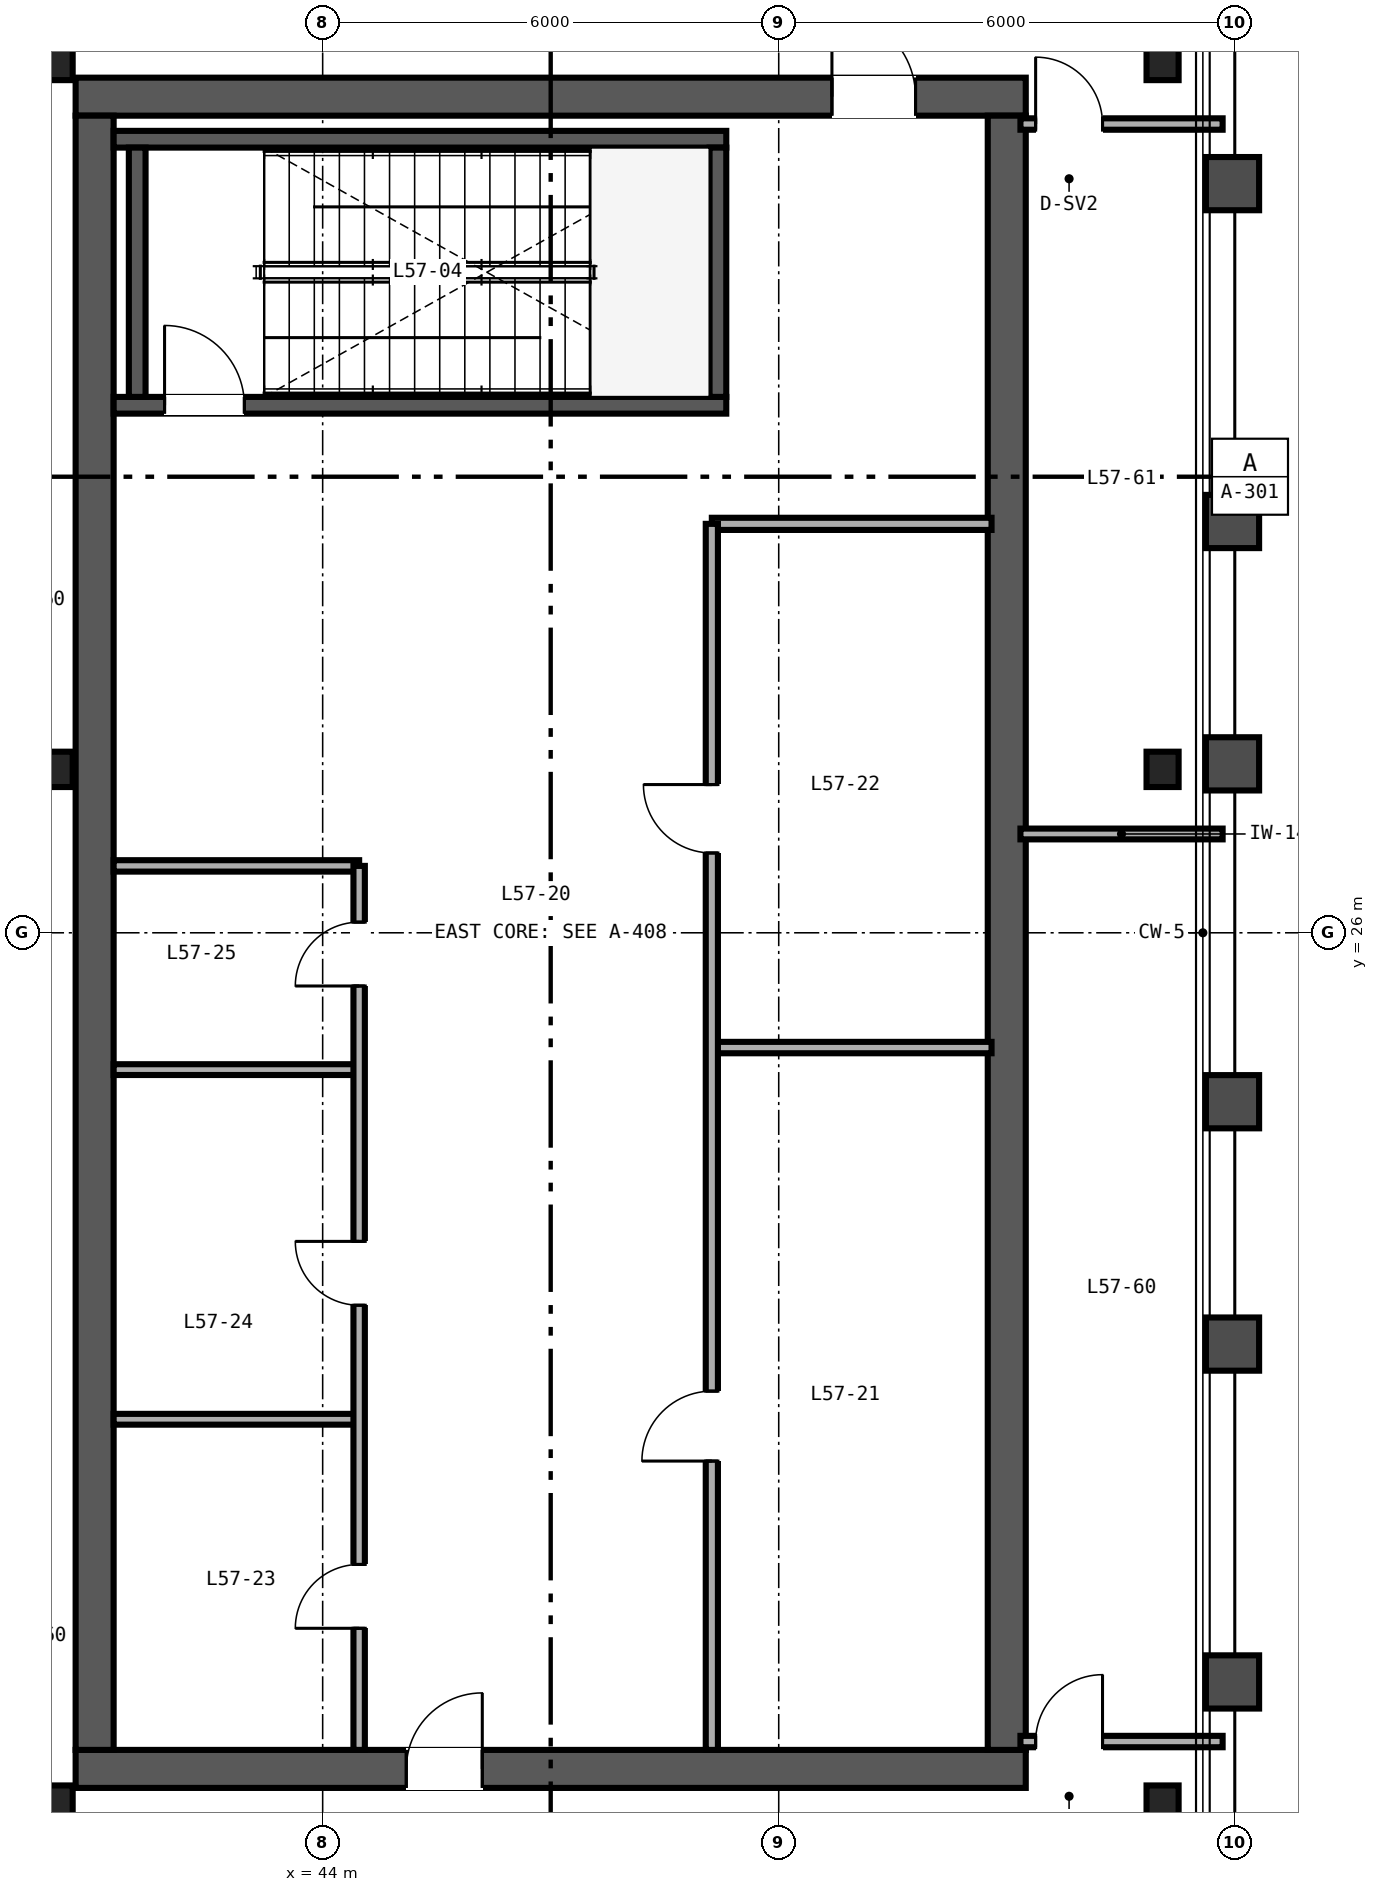
"""IFC4 building model, lengths in metres.
Left out: names, types, materials, properties, quantities, classifications, styles, units other than length and angle.
Written with IfcOpenShell. Run it as: python <this file> out.ifc"""

import sys

from ifc_helpers import new_model, si_unit, direction, frame, frame_2d, origin, origin_2d, place, context, subcontext, project, spatial, rectangle, i_section, extrude, source, transform, mapped, element, fill, save


model = new_model("IFC4")
c1 = context("Model", 3, precision=1e-05, world=origin(), true_north=direction((0.0, 1.0)))
c2 = subcontext(c1, "Body", "Model", "MODEL_VIEW")
j1 = project(units=[si_unit("LENGTHUNIT", "METRE"), si_unit("PLANEANGLEUNIT", "RADIAN")], contexts=[c1])
p1 = place(None, origin())
s1 = spatial("IfcSite", under=j1, at=p1, CompositionType="ELEMENT")
p2 = place(p1, origin())
s2 = spatial("IfcBuilding", under=s1, at=p2, CompositionType="ELEMENT")
p3 = place(p2, frame((0.0, 0.0, 228.0)))
s3 = spatial("IfcBuildingStorey", under=s2, at=p3, CompositionType="ELEMENT", Elevation=228.0)
p4 = place(p3, frame((40.75, 15.0, 0.0), z_axis=(0.0, 0.0, 1.0), x_axis=(1.0, 0.0, 0.0)))
e1 = element("IfcWall", 1, at=p4, inside=s3, PredefinedType="SHEAR", context=c2, shape_type="SweptSolid", body=[
    extrude(rectangle(XDim=12.5, YDim=0.5, at=frame_2d((6.25, 0.0))), origin(), (0.0, 0.0, 1.0), 4.58),
])
p5 = place(p4, frame((4.35, 0.0, 0.0)))
e2 = element("IfcOpeningElement", 2, at=p5, cuts=e1, PredefinedType="OPENING", context=c2, shape_type="SweptSolid", body=[
    extrude(rectangle(XDim=1.0, YDim=2.15, at=frame_2d((0.5, 1.075))), frame((0.0, 0.26, 0.0), z_axis=(0.0, -1.0, 0.0), x_axis=(1.0, 0.0, 0.0)), (0.0, 0.0, 1.0), 0.52),
])
p6 = place(p3, frame((40.75, 37.0, 0.0), z_axis=(0.0, 0.0, 1.0), x_axis=(1.0, 0.0, 0.0)))
e3 = element("IfcWall", 3, at=p6, inside=s3, PredefinedType="SHEAR", context=c2, shape_type="SweptSolid", body=[
    extrude(rectangle(XDim=12.5, YDim=0.5, at=frame_2d((6.25, 0.0))), origin(), (0.0, 0.0, 1.0), 4.58),
])
p7 = place(p6, frame((9.95, 0.0, 0.0)))
e4 = element("IfcOpeningElement", 4, at=p7, cuts=e3, PredefinedType="OPENING", context=c2, shape_type="SweptSolid", body=[
    extrude(rectangle(XDim=1.1, YDim=2.15, at=frame_2d((0.55, 1.075))), frame((0.0, 0.26, 0.0), z_axis=(0.0, -1.0, 0.0), x_axis=(1.0, 0.0, 0.0)), (0.0, 0.0, 1.0), 0.52),
])
for number, where, z_axis, x_axis in (
    (5, (41.0, 15.25, 0.0), (0.0, 0.0, 1.0), (0.0, 1.0, 0.0)),
    (6, (53.0, 15.25, 0.0), (0.0, 0.0, 1.0), (0.0, 1.0, 0.0)),
):
    element("IfcWall", number, at=place(p3, frame(where, z_axis=z_axis, x_axis=x_axis)), inside=s3, PredefinedType="SHEAR", context=c2, shape_type="SweptSolid", body=[
        extrude(rectangle(XDim=21.5, YDim=0.5, at=frame_2d((10.75, 0.0))), origin(), (0.0, 0.0, 1.0), 4.58),
    ])
p8 = place(p3, frame((41.25, 32.94, 0.0), z_axis=(0.0, 0.0, 1.0), x_axis=(1.0, 0.0, 0.0)))
e7 = element("IfcWall", 7, at=p8, inside=s3, PredefinedType="SHEAR", context=c2, shape_type="SweptSolid", body=[
    extrude(rectangle(XDim=8.06, YDim=0.22, at=frame_2d((4.03, 0.0))), origin(), (0.0, 0.0, 1.0), 4.6),
])
p9 = place(p8, frame((0.67, 0.0, 0.0)))
e8 = element("IfcOpeningElement", 8, at=p9, cuts=e7, PredefinedType="OPENING", context=c2, shape_type="SweptSolid", body=[
    extrude(rectangle(XDim=1.05, YDim=2.15, at=frame_2d((0.525, 1.075))), frame((0.0, 0.12, 0.0), z_axis=(0.0, -1.0, 0.0), x_axis=(1.0, 0.0, 0.0)), (0.0, 0.0, 1.0), 0.24),
])
p10 = place(p3, frame((41.25, 36.44, 0.0), z_axis=(0.0, 0.0, 1.0), x_axis=(1.0, 0.0, 0.0)))
e9 = element("IfcWall", 9, at=p10, inside=s3, PredefinedType="SHEAR", context=c2, shape_type="SweptSolid", body=[
    extrude(rectangle(XDim=8.06, YDim=0.22, at=frame_2d((4.03, 0.0))), origin(), (0.0, 0.0, 1.0), 4.6),
])
for number, where, z_axis, x_axis in (
    (10, (41.56, 33.05, 0.0), (0.0, 0.0, 1.0), (0.0, 1.0, 0.0)),
    (11, (49.2, 33.05, 0.0), (0.0, 0.0, 1.0), (0.0, 1.0, 0.0)),
):
    element("IfcWall", number, at=place(p3, frame(where, z_axis=z_axis, x_axis=x_axis)), inside=s3, PredefinedType="SHEAR", context=c2, shape_type="SweptSolid", body=[
        extrude(rectangle(XDim=3.28, YDim=0.22, at=frame_2d((1.64, 0.0))), origin(), (0.0, 0.0, 1.0), 4.6),
    ])
m1 = source(origin(), c2, "Body", "SweptSolid", [
    extrude(i_section(OverallWidth=0.422, OverallDepth=0.465, WebThickness=0.045, FlangeThickness=0.073, FilletRadius=0.025, at=origin_2d()), origin(), (0.0, 0.0, 1.0), 4.58),
])
for number, where, z_axis, x_axis in (
    (12, (40.5, 14.55, 0.0), (0.0, 0.0, 1.0), (1.0, 0.0, 0.0)),
    (13, (55.05, 14.55, 0.0), (0.0, 0.0, 1.0), (1.0, 0.0, 0.0)),
    (14, (40.5, 28.15, 0.0), (0.0, 0.0, 1.0), (1.0, 0.0, 0.0)),
    (15, (55.05, 28.15, 0.0), (0.0, 0.0, 1.0), (1.0, 0.0, 0.0)),
    (16, (40.5, 37.45, 0.0), (0.0, 0.0, 1.0), (1.0, 0.0, 0.0)),
    (17, (55.05, 37.45, 0.0), (0.0, 0.0, 1.0), (1.0, 0.0, 0.0)),
):
    element("IfcColumn", number, at=place(p3, frame(where, z_axis=z_axis, x_axis=x_axis)), inside=s3, PredefinedType="COLUMN", context=c2, shape_type="MappedRepresentation", body=[
        mapped(m1, transform((0.0, 0.0, 0.0), scale=1.0)),
    ])
p11 = place(p3, frame((49.12, 31.38, 0.0), z_axis=(0.0, 0.0, 1.0), x_axis=(1.0, 0.0, 0.0)))
e18 = element("IfcWall", 18, at=p11, inside=s3, PredefinedType="PARTITIONING", context=c2, shape_type="SweptSolid", body=[
    extrude(rectangle(XDim=3.68, YDim=0.16, at=frame_2d((1.84, 0.0))), origin(), (0.0, 0.0, 1.0), 3.68),
])
p12 = place(p3, frame((49.12, 24.49, 0.0), z_axis=(0.0, 0.0, 1.0), x_axis=(1.0, 0.0, 0.0)))
e19 = element("IfcWall", 19, at=p12, inside=s3, PredefinedType="PARTITIONING", context=c2, shape_type="SweptSolid", body=[
    extrude(rectangle(XDim=3.68, YDim=0.15, at=frame_2d((1.84, 0.0))), origin(), (0.0, 0.0, 1.0), 4.58),
])
p13 = place(p3, frame((49.12, 15.25, 0.0), z_axis=(0.0, 0.0, 1.0), x_axis=(0.0, 1.0, 0.0)))
e20 = element("IfcWall", 20, at=p13, inside=s3, PredefinedType="PARTITIONING", context=c2, shape_type="SweptSolid", body=[
    extrude(rectangle(XDim=16.13, YDim=0.16, at=frame_2d((8.065, 0.0))), origin(), (0.0, 0.0, 1.0), 3.653),
])
p14 = place(p13, frame((3.8, 0.0, 0.0)))
e21 = element("IfcOpeningElement", 21, at=p14, cuts=e20, PredefinedType="OPENING", context=c2, shape_type="SweptSolid", body=[
    extrude(rectangle(XDim=0.92, YDim=2.15, at=frame_2d((0.46, 1.075))), frame((0.0, 0.09, 0.0), z_axis=(0.0, -1.0, 0.0), x_axis=(1.0, 0.0, 0.0)), (0.0, 0.0, 1.0), 0.18),
])
p15 = place(p13, frame((11.8, 0.0, 0.0)))
e22 = element("IfcOpeningElement", 22, at=p15, cuts=e20, PredefinedType="OPENING", context=c2, shape_type="SweptSolid", body=[
    extrude(rectangle(XDim=0.9, YDim=2.15, at=frame_2d((0.45, 1.075))), frame((0.0, 0.09, 0.0), z_axis=(0.0, -1.0, 0.0), x_axis=(1.0, 0.0, 0.0)), (0.0, 0.0, 1.0), 0.18),
])
p16 = place(p3, frame((41.25, 26.88, 0.0), z_axis=(0.0, 0.0, 1.0), x_axis=(1.0, 0.0, 0.0)))
e23 = element("IfcWall", 23, at=p16, inside=s3, PredefinedType="PARTITIONING", context=c2, shape_type="SweptSolid", body=[
    extrude(rectangle(XDim=3.23, YDim=0.15, at=frame_2d((1.615, 0.0))), origin(), (0.0, 0.0, 1.0), 4.58),
])
for number, where, z_axis, x_axis in (
    (24, (41.25, 19.6, 0.0), (0.0, 0.0, 1.0), (1.0, 0.0, 0.0)),
    (25, (41.25, 24.2, 0.0), (0.0, 0.0, 1.0), (1.0, 0.0, 0.0)),
):
    element("IfcWall", number, at=place(p3, frame(where, z_axis=z_axis, x_axis=x_axis)), inside=s3, PredefinedType="PARTITIONING", context=c2, shape_type="SweptSolid", body=[
        extrude(rectangle(XDim=3.23, YDim=0.142, at=frame_2d((1.615, 0.0))), origin(), (0.0, 0.0, 1.0), 4.58),
    ])
p17 = place(p3, frame((44.48, 15.25, 0.0), z_axis=(0.0, 0.0, 1.0), x_axis=(0.0, 1.0, 0.0)))
e26 = element("IfcWall", 26, at=p17, inside=s3, PredefinedType="PARTITIONING", context=c2, shape_type="SweptSolid", body=[
    extrude(rectangle(XDim=11.63, YDim=0.15, at=frame_2d((5.815, 0.0))), origin(), (0.0, 0.0, 1.0), 4.58),
])
p18 = place(p17, frame((1.6, 0.0, 0.0)))
e27 = element("IfcOpeningElement", 27, at=p18, cuts=e26, PredefinedType="OPENING", context=c2, shape_type="SweptSolid", body=[
    extrude(rectangle(XDim=0.84, YDim=2.1, at=frame_2d((0.42, 1.05))), frame((0.0, 0.085, 0.0), z_axis=(0.0, -1.0, 0.0), x_axis=(1.0, 0.0, 0.0)), (0.0, 0.0, 1.0), 0.17),
])
p19 = place(p17, frame((5.85, 0.0, 0.0)))
e28 = element("IfcOpeningElement", 28, at=p19, cuts=e26, PredefinedType="OPENING", context=c2, shape_type="SweptSolid", body=[
    extrude(rectangle(XDim=0.84, YDim=2.1, at=frame_2d((0.42, 1.05))), frame((0.0, 0.085, 0.0), z_axis=(0.0, -1.0, 0.0), x_axis=(1.0, 0.0, 0.0)), (0.0, 0.0, 1.0), 0.17),
])
p20 = place(p17, frame((10.05, 0.0, 0.0)))
e29 = element("IfcOpeningElement", 29, at=p20, cuts=e26, PredefinedType="OPENING", context=c2, shape_type="SweptSolid", body=[
    extrude(rectangle(XDim=0.84, YDim=2.1, at=frame_2d((0.42, 1.05))), frame((0.0, 0.085, 0.0), z_axis=(0.0, -1.0, 0.0), x_axis=(1.0, 0.0, 0.0)), (0.0, 0.0, 1.0), 0.17),
])
p21 = place(p3, frame((53.18, 15.36, 0.0), z_axis=(0.0, 0.0, 1.0), x_axis=(1.0, 0.0, 0.0)))
e30 = element("IfcWall", 30, at=p21, inside=s3, PredefinedType="PARTITIONING", context=c2, shape_type="SweptSolid", body=[
    extrude(rectangle(XDim=2.66, YDim=0.15, at=frame_2d((1.33, 0.0))), origin(), (0.0, 0.0, 1.0), 3.801),
])
p22 = place(p21, frame((0.2, 0.0, 0.0)))
e31 = element("IfcOpeningElement", 31, at=p22, cuts=e30, PredefinedType="OPENING", context=c2, shape_type="SweptSolid", body=[
    extrude(rectangle(XDim=0.88, YDim=2.15, at=frame_2d((0.44, 1.075))), frame((0.0, 0.085, 0.0), z_axis=(0.0, -1.0, 0.0), x_axis=(1.0, 0.0, 0.0)), (0.0, 0.0, 1.0), 0.17),
])
p23 = place(p3, frame((53.18, 36.64, 0.0), z_axis=(0.0, 0.0, 1.0), x_axis=(1.0, 0.0, 0.0)))
e32 = element("IfcWall", 32, at=p23, inside=s3, PredefinedType="PARTITIONING", context=c2, shape_type="SweptSolid", body=[
    extrude(rectangle(XDim=2.66, YDim=0.15, at=frame_2d((1.33, 0.0))), origin(), (0.0, 0.0, 1.0), 3.963),
])
p24 = place(p23, frame((0.2, 0.0, 0.0)))
e33 = element("IfcOpeningElement", 33, at=p24, cuts=e32, PredefinedType="OPENING", context=c2, shape_type="SweptSolid", body=[
    extrude(rectangle(XDim=0.88, YDim=2.15, at=frame_2d((0.44, 1.075))), frame((0.0, 0.085, 0.0), z_axis=(0.0, -1.0, 0.0), x_axis=(1.0, 0.0, 0.0)), (0.0, 0.0, 1.0), 0.17),
])
p25 = place(p3, frame((53.18, 27.3, 0.0), z_axis=(0.0, 0.0, 1.0), x_axis=(1.0, 0.0, 0.0)))
e34 = element("IfcWall", 34, at=p25, inside=s3, PredefinedType="PARTITIONING", context=c2, shape_type="SweptSolid", body=[
    extrude(rectangle(XDim=2.66, YDim=0.142, at=frame_2d((1.33, 0.0))), origin(), (0.0, 0.0, 1.0), 3.801),
])
m2 = source(origin(), c2, "Body", "SweptSolid", [
    extrude(rectangle(XDim=1.05, YDim=2.15, at=frame_2d((0.525, 1.075))), frame((0.0, 0.025, 0.0), z_axis=(0.0, -1.0, 0.0), x_axis=(1.0, 0.0, 0.0)), (0.0, 0.0, 1.0), 0.05),
])
p26 = place(p9, origin())
e35 = element("IfcDoor", 35, at=p26, inside=s3, OperationType="SINGLE_SWING_LEFT", PredefinedType="DOOR", context=c2, shape_type="MappedRepresentation", body=[
    mapped(m2, transform((0.0, 0.0, 0.0), scale=1.0)),
])
fill(e8, e35)
m3 = source(origin(), c2, "Body", "SweptSolid", [
    extrude(rectangle(XDim=1.0, YDim=2.15, at=frame_2d((0.5, 1.075))), frame((0.0, 0.025, 0.0), z_axis=(0.0, -1.0, 0.0), x_axis=(1.0, 0.0, 0.0)), (0.0, 0.0, 1.0), 0.05),
])
p27 = place(p5, origin())
e36 = element("IfcDoor", 36, at=p27, inside=s3, OperationType="SINGLE_SWING_RIGHT", PredefinedType="DOOR", context=c2, shape_type="MappedRepresentation", body=[
    mapped(m3, transform((0.0, 0.0, 0.0), scale=1.0)),
])
fill(e2, e36)
m4 = source(origin(), c2, "Body", "SweptSolid", [
    extrude(rectangle(XDim=1.1, YDim=2.15, at=frame_2d((0.55, 1.075))), frame((0.0, 0.025, 0.0), z_axis=(0.0, -1.0, 0.0), x_axis=(1.0, 0.0, 0.0)), (0.0, 0.0, 1.0), 0.05),
])
p28 = place(p7, origin())
e37 = element("IfcDoor", 37, at=p28, inside=s3, OperationType="SINGLE_SWING_LEFT", PredefinedType="DOOR", context=c2, shape_type="MappedRepresentation", body=[
    mapped(m4, transform((0.0, 0.0, 0.0), scale=1.0)),
])
fill(e4, e37)
m5 = source(origin(), c2, "Body", "SweptSolid", [
    extrude(rectangle(XDim=0.92, YDim=2.15, at=frame_2d((0.46, 1.075))), frame((0.0, 0.025, 0.0), z_axis=(0.0, -1.0, 0.0), x_axis=(1.0, 0.0, 0.0)), (0.0, 0.0, 1.0), 0.05),
])
p29 = place(p14, origin())
e38 = element("IfcDoor", 38, at=p29, inside=s3, OperationType="SINGLE_SWING_LEFT", PredefinedType="DOOR", context=c2, shape_type="MappedRepresentation", body=[
    mapped(m5, transform((0.0, 0.0, 0.0), scale=1.0)),
])
fill(e21, e38)
m6 = source(origin(), c2, "Body", "SweptSolid", [
    extrude(rectangle(XDim=0.9, YDim=2.15, at=frame_2d((0.45, 1.075))), frame((0.0, 0.025, 0.0), z_axis=(0.0, -1.0, 0.0), x_axis=(1.0, 0.0, 0.0)), (0.0, 0.0, 1.0), 0.05),
])
p30 = place(p15, origin())
e39 = element("IfcDoor", 39, at=p30, inside=s3, OperationType="SINGLE_SWING_RIGHT", PredefinedType="DOOR", context=c2, shape_type="MappedRepresentation", body=[
    mapped(m6, transform((0.0, 0.0, 0.0), scale=1.0)),
])
fill(e22, e39)
m7 = source(origin(), c2, "Body", "SweptSolid", [
    extrude(rectangle(XDim=0.84, YDim=2.1, at=frame_2d((0.42, 1.05))), frame((0.0, 0.025, 0.0), z_axis=(0.0, -1.0, 0.0), x_axis=(1.0, 0.0, 0.0)), (0.0, 0.0, 1.0), 0.05),
])
p31 = place(p18, origin())
e40 = element("IfcDoor", 40, at=p31, inside=s3, OperationType="SINGLE_SWING_LEFT", PredefinedType="DOOR", context=c2, shape_type="MappedRepresentation", body=[
    mapped(m7, transform((0.0, 0.0, 0.0), scale=1.0)),
])
fill(e27, e40)
p32 = place(p19, origin())
e41 = element("IfcDoor", 41, at=p32, inside=s3, OperationType="SINGLE_SWING_RIGHT", PredefinedType="DOOR", context=c2, shape_type="MappedRepresentation", body=[
    mapped(m7, transform((0.0, 0.0, 0.0), scale=1.0)),
])
fill(e28, e41)
p33 = place(p20, origin())
e42 = element("IfcDoor", 42, at=p33, inside=s3, OperationType="SINGLE_SWING_LEFT", PredefinedType="DOOR", context=c2, shape_type="MappedRepresentation", body=[
    mapped(m7, transform((0.0, 0.0, 0.0), scale=1.0)),
])
fill(e29, e42)
m8 = source(origin(), c2, "Body", "SweptSolid", [
    extrude(rectangle(XDim=0.88, YDim=2.15, at=frame_2d((0.44, 1.075))), frame((0.0, 0.025, 0.0), z_axis=(0.0, -1.0, 0.0), x_axis=(1.0, 0.0, 0.0)), (0.0, 0.0, 1.0), 0.05),
])
p34 = place(p22, origin())
e43 = element("IfcDoor", 43, at=p34, inside=s3, OperationType="SINGLE_SWING_RIGHT", PredefinedType="DOOR", context=c2, shape_type="MappedRepresentation", body=[
    mapped(m8, transform((0.0, 0.0, 0.0), scale=1.0)),
])
fill(e31, e43)
p35 = place(p24, origin())
e44 = element("IfcDoor", 44, at=p35, inside=s3, OperationType="SINGLE_SWING_LEFT", PredefinedType="DOOR", context=c2, shape_type="MappedRepresentation", body=[
    mapped(m8, transform((0.0, 0.0, 0.0), scale=1.0)),
])
fill(e33, e44)
save(model, sys.argv[1])
